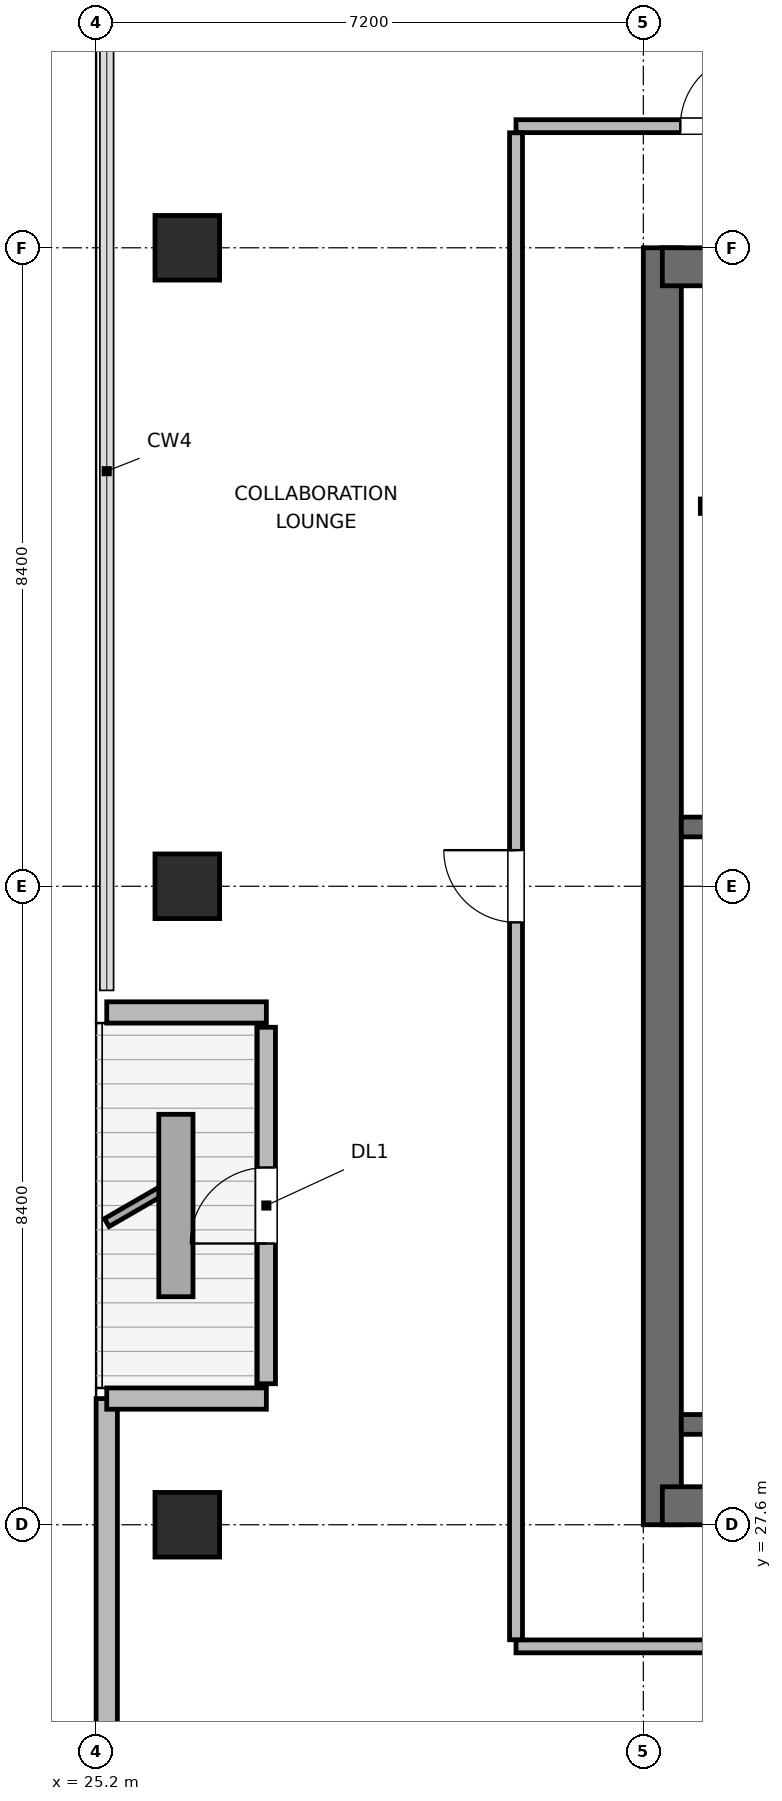
"""IFC4 building model, lengths in metres.
Left out: names, types, materials, properties, quantities, classifications, styles, units other than length and angle.
Written with IfcOpenShell. Run it as: python <this file> out.ifc"""

import sys

from ifc_helpers import new_model, si_unit, direction, frame, frame_2d, origin, origin_2d, place, context, subcontext, project, spatial, rectangle, extrude, element, fill, save


model = new_model("IFC4")
c1 = context("Model", 3, precision=1e-05, world=origin(), true_north=direction((0.0, 1.0)))
c2 = subcontext(c1, "Body", "Model", "MODEL_VIEW")
j1 = project(units=[si_unit("LENGTHUNIT", "METRE"), si_unit("PLANEANGLEUNIT", "RADIAN")], contexts=[c1])
p1 = place(None, origin())
s1 = spatial("IfcSite", under=j1, at=p1, CompositionType="ELEMENT")
p2 = place(p1, origin())
s2 = spatial("IfcBuilding", under=s1, at=p2, CompositionType="ELEMENT")
p3 = place(p2, frame((0.0, 0.0, 314.1)))
s3 = spatial("IfcBuildingStorey", under=s2, at=p3, CompositionType="ELEMENT", Elevation=314.1)
p4 = place(p3, frame((32.65, 27.6, 0.0), z_axis=(0.0, 0.0, 1.0), x_axis=(0.0, 1.0, 0.0)))
e1 = element("IfcWall", 1, at=p4, inside=s3, PredefinedType="SHEAR", context=c2, shape_type="SweptSolid", body=[
    extrude(rectangle(XDim=16.8, YDim=0.5, at=frame_2d((8.4, 0.0))), origin(), (0.0, 0.0, 1.0), 3.9),
])
p5 = place(p3, frame((32.65, 27.85, 0.0), z_axis=(0.0, 0.0, 1.0), x_axis=(1.0, 0.0, 0.0)))
e2 = element("IfcWall", 2, at=p5, inside=s3, PredefinedType="SHEAR", context=c2, shape_type="SweptSolid", body=[
    extrude(rectangle(XDim=9.5, YDim=0.5, at=frame_2d((4.75, 0.0))), origin(), (0.0, 0.0, 1.0), 3.9),
])
p6 = place(p5, frame((5.075, 0.0, 0.0)))
e3 = element("IfcOpeningElement", 3, at=p6, cuts=e2, PredefinedType="OPENING", context=c2, shape_type="SweptSolid", body=[
    extrude(rectangle(XDim=1.05, YDim=2.04, at=frame_2d((0.525, 1.02))), frame((0.0, 0.26, 0.0), z_axis=(0.0, -1.0, 0.0), x_axis=(1.0, 0.0, 0.0)), (0.0, 0.0, 1.0), 0.52),
])
p7 = place(p3, frame((32.65, 44.15, 0.0), z_axis=(0.0, 0.0, 1.0), x_axis=(1.0, 0.0, 0.0)))
e4 = element("IfcWall", 4, at=p7, inside=s3, PredefinedType="SHEAR", context=c2, shape_type="SweptSolid", body=[
    extrude(rectangle(XDim=9.5, YDim=0.5, at=frame_2d((4.75, 0.0))), origin(), (0.0, 0.0, 1.0), 3.9),
])
p8 = place(p7, frame((1.075, 0.0, 0.0)))
e5 = element("IfcOpeningElement", 5, at=p8, cuts=e4, PredefinedType="OPENING", context=c2, shape_type="SweptSolid", body=[
    extrude(rectangle(XDim=0.95, YDim=2.04, at=frame_2d((0.475, 1.02))), frame((0.0, 0.26, 0.0), z_axis=(0.0, -1.0, 0.0), x_axis=(1.0, 0.0, 0.0)), (0.0, 0.0, 1.0), 0.52),
])
p9 = place(p7, frame((4.325, 0.0, 0.0)))
e6 = element("IfcOpeningElement", 6, at=p9, cuts=e4, PredefinedType="OPENING", context=c2, shape_type="SweptSolid", body=[
    extrude(rectangle(XDim=0.9, YDim=2.02, at=frame_2d((0.45, 1.01))), frame((0.0, 0.26, 0.0), z_axis=(0.0, -1.0, 0.0), x_axis=(1.0, 0.0, 0.0)), (0.0, 0.0, 1.0), 0.52),
])
p10 = place(p7, frame((7.225, 0.0, 0.0)))
e7 = element("IfcOpeningElement", 7, at=p10, cuts=e4, PredefinedType="OPENING", context=c2, shape_type="SweptSolid", body=[
    extrude(rectangle(XDim=0.9, YDim=2.02, at=frame_2d((0.45, 1.01))), frame((0.0, 0.26, 0.0), z_axis=(0.0, -1.0, 0.0), x_axis=(1.0, 0.0, 0.0)), (0.0, 0.0, 1.0), 0.52),
])
for number, where, z_axis, x_axis in (
    (8, (32.9, 28.92, 0.0), (0.0, 0.0, 1.0), (1.0, 0.0, 0.0)),
    (9, (32.9, 36.78, 0.0), (0.0, 0.0, 1.0), (1.0, 0.0, 0.0)),
):
    element("IfcWall", number, at=place(p3, frame(where, z_axis=z_axis, x_axis=x_axis)), inside=s3, PredefinedType="SHEAR", context=c2, shape_type="SweptSolid", body=[
        extrude(rectangle(XDim=4.21, YDim=0.26, at=frame_2d((2.105, 0.0))), origin(), (0.0, 0.0, 1.0), 3.9),
    ])
for number, where, z_axis, x_axis in (
    (10, (26.4, 27.6, 0.0), (0.0, 0.0, 1.0), (1.0, 0.0, 0.0)),
    (11, (26.4, 36.0, 0.0), (0.0, 0.0, 1.0), (1.0, 0.0, 0.0)),
    (12, (26.4, 44.4, 0.0), (0.0, 0.0, 1.0), (1.0, 0.0, 0.0)),
):
    element("IfcColumn", number, at=place(p3, frame(where, z_axis=z_axis, x_axis=x_axis)), inside=s3, PredefinedType="COLUMN", context=c2, shape_type="SweptSolid", body=[
        extrude(rectangle(XDim=0.85, YDim=0.85, at=origin_2d()), origin(), (0.0, 0.0, 1.0), 3.9),
    ])
p11 = place(p3, frame((25.34, 23.418, 0.0), z_axis=(0.0, 0.0, 1.0), x_axis=(0.0, 1.0, 0.0)))
e13 = element("IfcWall", 13, at=p11, inside=s3, PredefinedType="SOLIDWALL", context=c2, shape_type="SweptSolid", body=[
    extrude(rectangle(XDim=5.842, YDim=0.28, at=frame_2d((2.921, 0.0))), origin(), (0.0, 0.0, 1.0), 3.68),
])
p12 = place(p3, frame((25.34, 29.26, 0.0), z_axis=(0.0, 0.0, 1.0), x_axis=(1.0, 0.0, 0.0)))
e14 = element("IfcWall", 14, at=p12, inside=s3, PredefinedType="SOLIDWALL", context=c2, shape_type="SweptSolid", body=[
    extrude(rectangle(XDim=2.1, YDim=0.28, at=frame_2d((1.05, 0.0))), origin(), (0.0, 0.0, 1.0), 3.126),
])
p13 = place(p3, frame((27.44, 29.455, 0.0), z_axis=(0.0, 0.0, 1.0), x_axis=(0.0, 1.0, 0.0)))
e15 = element("IfcWall", 15, at=p13, inside=s3, PredefinedType="SOLIDWALL", context=c2, shape_type="SweptSolid", body=[
    extrude(rectangle(XDim=4.69, YDim=0.24, at=frame_2d((2.345, 0.0))), origin(), (0.0, 0.0, 1.0), 3.311),
])
p14 = place(p13, frame((1.845, 0.0, 0.0)))
e16 = element("IfcOpeningElement", 16, at=p14, cuts=e15, PredefinedType="OPENING", context=c2, shape_type="SweptSolid", body=[
    extrude(rectangle(XDim=1.0, YDim=2.02, at=frame_2d((0.5, 1.01))), frame((0.0, 0.13, 0.0), z_axis=(0.0, -1.0, 0.0), x_axis=(1.0, 0.0, 0.0)), (0.0, 0.0, 1.0), 0.26),
])
p15 = place(p3, frame((27.44, 34.34, 0.0), z_axis=(0.0, 0.0, 1.0), x_axis=(-1.0, 0.0, 0.0)))
e17 = element("IfcWall", 17, at=p15, inside=s3, PredefinedType="SOLIDWALL", context=c2, shape_type="SweptSolid", body=[
    extrude(rectangle(XDim=2.1, YDim=0.28, at=frame_2d((1.05, 0.0))), origin(), (0.0, 0.0, 1.0), 3.126),
])
p16 = place(p3, frame((33.15, 41.0, 0.0), z_axis=(0.0, 0.0, 1.0), x_axis=(1.0, 0.0, 0.0)))
e18 = element("IfcWall", 18, at=p16, inside=s3, PredefinedType="PLUMBINGWALL", context=c2, shape_type="SweptSolid", body=[
    extrude(rectangle(XDim=8.5, YDim=0.19, at=frame_2d((4.25, 0.0))), origin(), (0.0, 0.0, 1.0), 3.68),
])
p17 = place(p3, frame((30.725, 26.0, 0.0), z_axis=(0.0, 0.0, 1.0), x_axis=(1.0, 0.0, 0.0)))
e19 = element("IfcWall", 19, at=p17, inside=s3, PredefinedType="PARTITIONING", context=c2, shape_type="SweptSolid", body=[
    extrude(rectangle(XDim=34.55, YDim=0.17, at=frame_2d((17.275, 0.0))), origin(), (0.0, 0.0, 1.0), 3.68),
])
p18 = place(p17, frame((2.563, 0.0, 0.0)))
e20 = element("IfcOpeningElement", 20, at=p18, cuts=e19, PredefinedType="OPENING", context=c2, shape_type="SweptSolid", body=[
    extrude(rectangle(XDim=0.95, YDim=2.04, at=frame_2d((0.475, 1.02))), frame((0.0, 0.095, 0.0), z_axis=(0.0, -1.0, 0.0), x_axis=(1.0, 0.0, 0.0)), (0.0, 0.0, 1.0), 0.19),
])
p19 = place(p17, frame((7.6, 0.0, 0.0)))
e21 = element("IfcOpeningElement", 21, at=p19, cuts=e19, PredefinedType="OPENING", context=c2, shape_type="SweptSolid", body=[
    extrude(rectangle(XDim=0.95, YDim=2.04, at=frame_2d((0.475, 1.02))), frame((0.0, 0.095, 0.0), z_axis=(0.0, -1.0, 0.0), x_axis=(1.0, 0.0, 0.0)), (0.0, 0.0, 1.0), 0.19),
])
p20 = place(p17, frame((12.9, 0.0, 0.0)))
e22 = element("IfcOpeningElement", 22, at=p20, cuts=e19, PredefinedType="OPENING", context=c2, shape_type="SweptSolid", body=[
    extrude(rectangle(XDim=0.95, YDim=2.04, at=frame_2d((0.475, 1.02))), frame((0.0, 0.095, 0.0), z_axis=(0.0, -1.0, 0.0), x_axis=(1.0, 0.0, 0.0)), (0.0, 0.0, 1.0), 0.19),
])
p21 = place(p17, frame((18.7, 0.0, 0.0)))
e23 = element("IfcOpeningElement", 23, at=p21, cuts=e19, PredefinedType="OPENING", context=c2, shape_type="SweptSolid", body=[
    extrude(rectangle(XDim=0.95, YDim=2.04, at=frame_2d((0.475, 1.02))), frame((0.0, 0.095, 0.0), z_axis=(0.0, -1.0, 0.0), x_axis=(1.0, 0.0, 0.0)), (0.0, 0.0, 1.0), 0.19),
])
p22 = place(p17, frame((23.4, 0.0, 0.0)))
e24 = element("IfcOpeningElement", 24, at=p22, cuts=e19, PredefinedType="OPENING", context=c2, shape_type="SweptSolid", body=[
    extrude(rectangle(XDim=0.95, YDim=2.04, at=frame_2d((0.475, 1.02))), frame((0.0, 0.095, 0.0), z_axis=(0.0, -1.0, 0.0), x_axis=(1.0, 0.0, 0.0)), (0.0, 0.0, 1.0), 0.19),
])
p23 = place(p17, frame((27.5, 0.0, 0.0)))
e25 = element("IfcOpeningElement", 25, at=p23, cuts=e19, PredefinedType="OPENING", context=c2, shape_type="SweptSolid", body=[
    extrude(rectangle(XDim=0.95, YDim=2.04, at=frame_2d((0.475, 1.02))), frame((0.0, 0.095, 0.0), z_axis=(0.0, -1.0, 0.0), x_axis=(1.0, 0.0, 0.0)), (0.0, 0.0, 1.0), 0.19),
])
p24 = place(p17, frame((31.738, 0.0, 0.0)))
e26 = element("IfcOpeningElement", 26, at=p24, cuts=e19, PredefinedType="OPENING", context=c2, shape_type="SweptSolid", body=[
    extrude(rectangle(XDim=0.95, YDim=2.04, at=frame_2d((0.475, 1.02))), frame((0.0, 0.095, 0.0), z_axis=(0.0, -1.0, 0.0), x_axis=(1.0, 0.0, 0.0)), (0.0, 0.0, 1.0), 0.19),
])
p25 = place(p3, frame((30.725, 46.0, 0.0), z_axis=(0.0, 0.0, 1.0), x_axis=(1.0, 0.0, 0.0)))
e27 = element("IfcWall", 27, at=p25, inside=s3, PredefinedType="PARTITIONING", context=c2, shape_type="SweptSolid", body=[
    extrude(rectangle(XDim=34.55, YDim=0.17, at=frame_2d((17.275, 0.0))), origin(), (0.0, 0.0, 1.0), 3.68),
])
p26 = place(p25, frame((2.162, 0.0, 0.0)))
e28 = element("IfcOpeningElement", 28, at=p26, cuts=e27, PredefinedType="OPENING", context=c2, shape_type="SweptSolid", body=[
    extrude(rectangle(XDim=0.95, YDim=2.04, at=frame_2d((0.475, 1.02))), frame((0.0, 0.095, 0.0), z_axis=(0.0, -1.0, 0.0), x_axis=(1.0, 0.0, 0.0)), (0.0, 0.0, 1.0), 0.19),
])
p27 = place(p25, frame((9.8, 0.0, 0.0)))
e29 = element("IfcOpeningElement", 29, at=p27, cuts=e27, PredefinedType="OPENING", context=c2, shape_type="SweptSolid", body=[
    extrude(rectangle(XDim=0.95, YDim=2.04, at=frame_2d((0.475, 1.02))), frame((0.0, 0.095, 0.0), z_axis=(0.0, -1.0, 0.0), x_axis=(1.0, 0.0, 0.0)), (0.0, 0.0, 1.0), 0.19),
])
p28 = place(p25, frame((19.8, 0.0, 0.0)))
e30 = element("IfcOpeningElement", 30, at=p28, cuts=e27, PredefinedType="OPENING", context=c2, shape_type="SweptSolid", body=[
    extrude(rectangle(XDim=0.95, YDim=2.04, at=frame_2d((0.475, 1.02))), frame((0.0, 0.095, 0.0), z_axis=(0.0, -1.0, 0.0), x_axis=(1.0, 0.0, 0.0)), (0.0, 0.0, 1.0), 0.19),
])
p29 = place(p25, frame((29.438, 0.0, 0.0)))
e31 = element("IfcOpeningElement", 31, at=p29, cuts=e27, PredefinedType="OPENING", context=c2, shape_type="SweptSolid", body=[
    extrude(rectangle(XDim=0.95, YDim=2.04, at=frame_2d((0.475, 1.02))), frame((0.0, 0.095, 0.0), z_axis=(0.0, -1.0, 0.0), x_axis=(1.0, 0.0, 0.0)), (0.0, 0.0, 1.0), 0.19),
])
p30 = place(p3, frame((30.725, 26.087, 0.0), z_axis=(0.0, 0.0, 1.0), x_axis=(0.0, 1.0, 0.0)))
e32 = element("IfcWall", 32, at=p30, inside=s3, PredefinedType="PARTITIONING", context=c2, shape_type="SweptSolid", body=[
    extrude(rectangle(XDim=19.826, YDim=0.17, at=frame_2d((9.913, 0.0))), origin(), (0.0, 0.0, 1.0), 3.68),
])
p31 = place(p30, frame((9.438, 0.0, 0.0)))
e33 = element("IfcOpeningElement", 33, at=p31, cuts=e32, PredefinedType="OPENING", context=c2, shape_type="SweptSolid", body=[
    extrude(rectangle(XDim=0.95, YDim=2.04, at=frame_2d((0.475, 1.02))), frame((0.0, 0.095, 0.0), z_axis=(0.0, -1.0, 0.0), x_axis=(1.0, 0.0, 0.0)), (0.0, 0.0, 1.0), 0.19),
])
p32 = place(p14, origin())
e34 = element("IfcDoor", 34, at=p32, inside=s3, OperationType="SINGLE_SWING_LEFT", PredefinedType="DOOR", context=c2, shape_type="SweptSolid", body=[
    extrude(rectangle(XDim=1.0, YDim=2.02, at=frame_2d((0.5, 1.01))), frame((0.0, 0.025, 0.0), z_axis=(0.0, -1.0, 0.0), x_axis=(1.0, 0.0, 0.0)), (0.0, 0.0, 1.0), 0.05),
])
fill(e16, e34)
p33 = place(p26, origin())
e35 = element("IfcDoor", 35, at=p33, inside=s3, OperationType="SINGLE_SWING_RIGHT", PredefinedType="DOOR", context=c2, shape_type="SweptSolid", body=[
    extrude(rectangle(XDim=0.95, YDim=2.04, at=frame_2d((0.475, 1.02))), frame((0.0, 0.025, 0.0), z_axis=(0.0, -1.0, 0.0), x_axis=(1.0, 0.0, 0.0)), (0.0, 0.0, 1.0), 0.05),
])
fill(e28, e35)
p34 = place(p31, origin())
e36 = element("IfcDoor", 36, at=p34, inside=s3, OperationType="SINGLE_SWING_RIGHT", PredefinedType="DOOR", context=c2, shape_type="SweptSolid", body=[
    extrude(rectangle(XDim=0.95, YDim=2.04, at=frame_2d((0.475, 1.02))), frame((0.0, 0.025, 0.0), z_axis=(0.0, -1.0, 0.0), x_axis=(1.0, 0.0, 0.0)), (0.0, 0.0, 1.0), 0.05),
])
fill(e33, e36)
save(model, sys.argv[1])
